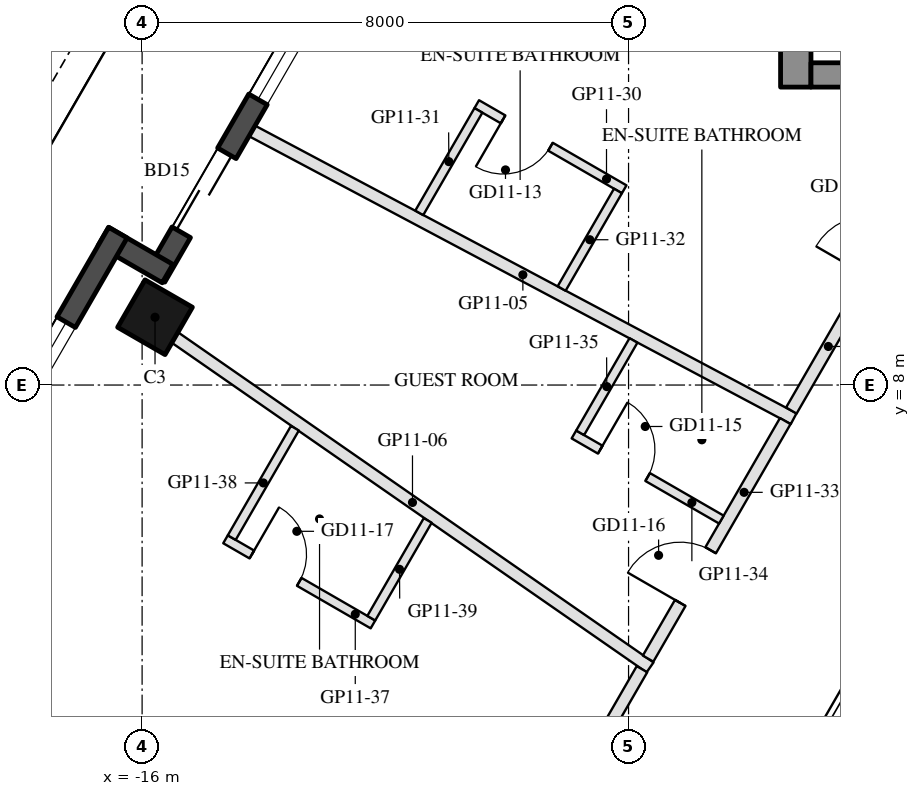
"""IFC4 building model, lengths in metres.
Left out: names, types, materials, properties, quantities, classifications, styles, units other than length and angle.
Written with IfcOpenShell. Run it as: python <this file> out.ifc"""

import sys

from ifc_helpers import new_model, si_unit, direction, frame, frame_2d, origin, origin_2d, place, context, subcontext, project, spatial, rectangle, hollow_rectangle, extrude, element, fill, save


model = new_model("IFC4")
c1 = context("Model", 3, precision=1e-05, world=origin(), true_north=direction((0.0, 1.0)))
c2 = subcontext(c1, "Body", "Model", "MODEL_VIEW")
j1 = project(units=[si_unit("LENGTHUNIT", "METRE"), si_unit("PLANEANGLEUNIT", "RADIAN")], contexts=[c1])
p1 = place(None, origin())
s1 = spatial("IfcSite", under=j1, at=p1, CompositionType="ELEMENT")
p2 = place(p1, origin())
s2 = spatial("IfcBuilding", under=s1, at=p2, CompositionType="ELEMENT")
p3 = place(p2, frame((0.0, 0.0, 127.9)))
s3 = spatial("IfcBuildingStorey", under=s2, at=p3, CompositionType="ELEMENT", Elevation=127.9)
p4 = place(p3, frame((-15.788, 9.115, 0.0), z_axis=(0.0, 0.0, 1.0), x_axis=(0.5, 0.866025403784, 0.0)))
e1 = element("IfcColumn", 1, at=p4, inside=s3, PredefinedType="COLUMN", context=c2, shape_type="SweptSolid", body=[
    extrude(hollow_rectangle(XDim=0.9, YDim=0.9, WallThickness=0.04, at=origin_2d()), origin(), (0.0, 0.0, 1.0), 3.7),
])
p5 = place(p3, frame((-12.409, 15.617, 0.0), z_axis=(0.0, 0.0, 1.0), x_axis=(-0.500003597184, -0.866023326939, 0.0)))
e2 = element("IfcWall", 2, at=p5, inside=s3, PredefinedType="SOLIDWALL", context=c2, shape_type="SweptSolid", body=[
    extrude(rectangle(XDim=6.74, YDim=0.35, at=frame_2d((3.37, 0.0))), origin(), (0.0, 0.0, 1.0), 3.45),
])
p6 = place(p5, frame((0.77, 0.0, 0.3)))
e3 = element("IfcOpeningElement", 3, at=p6, cuts=e2, PredefinedType="OPENING", context=c2, shape_type="SweptSolid", body=[
    extrude(rectangle(XDim=2.6, YDim=2.65, at=frame_2d((1.3, 1.325))), frame((0.0, 0.185, 0.0), z_axis=(0.0, -1.0, 0.0), x_axis=(1.0, 0.0, 0.0)), (0.0, 0.0, 1.0), 0.37),
])
p7 = place(p5, frame((4.394, 0.0, 0.0)))
e4 = element("IfcOpeningElement", 4, at=p7, cuts=e2, PredefinedType="OPENING", context=c2, shape_type="SweptSolid", body=[
    extrude(rectangle(XDim=1.5, YDim=2.4, at=frame_2d((0.75, 1.2))), frame((0.0, 0.185, 0.0), z_axis=(0.0, -1.0, 0.0), x_axis=(1.0, 0.0, 0.0)), (0.0, 0.0, 1.0), 0.37),
])
p8 = place(p3, frame((-15.581, 9.833, 0.0), z_axis=(0.0, 0.0, 1.0), x_axis=(-0.866055662726, 0.499947586314, 0.0)))
e5 = element("IfcWall", 5, at=p8, inside=s3, PredefinedType="SOLIDWALL", context=c2, shape_type="SweptSolid", body=[
    extrude(rectangle(XDim=1.22, YDim=0.35, at=frame_2d((0.61, 0.0))), origin(), (0.0, 0.0, 1.0), 3.45),
])
p9 = place(p3, frame((-16.398, 10.507, 0.0), z_axis=(0.0, 0.0, 1.0), x_axis=(-0.499999142773, -0.866025898704, 0.0)))
e6 = element("IfcWall", 6, at=p9, inside=s3, PredefinedType="SOLIDWALL", context=c2, shape_type="SweptSolid", body=[
    extrude(rectangle(XDim=9.7, YDim=0.35, at=frame_2d((4.85, 0.0))), origin(), (0.0, 0.0, 1.0), 3.45),
])
p10 = place(p9, frame((5.6, 0.0, 0.0)))
e7 = element("IfcOpeningElement", 7, at=p10, cuts=e6, PredefinedType="OPENING", context=c2, shape_type="SweptSolid", body=[
    extrude(rectangle(XDim=2.4, YDim=2.4, at=frame_2d((1.2, 1.2))), frame((0.0, 0.185, 0.0), z_axis=(0.0, -1.0, 0.0), x_axis=(1.0, 0.0, 0.0)), (0.0, 0.0, 1.0), 0.37),
])
p11 = place(p9, frame((1.7, 0.0, 0.3)))
e8 = element("IfcOpeningElement", 8, at=p11, cuts=e6, PredefinedType="OPENING", context=c2, shape_type="SweptSolid", body=[
    extrude(rectangle(XDim=1.6, YDim=2.65, at=frame_2d((0.8, 1.325))), frame((0.0, 0.185, 0.0), z_axis=(0.0, -1.0, 0.0), x_axis=(1.0, 0.0, 0.0)), (0.0, 0.0, 1.0), 0.37),
])
p12 = place(p9, frame((3.6, 0.0, 0.3)))
e9 = element("IfcOpeningElement", 9, at=p12, cuts=e6, PredefinedType="OPENING", context=c2, shape_type="SweptSolid", body=[
    extrude(rectangle(XDim=1.6, YDim=2.65, at=frame_2d((0.8, 1.325))), frame((0.0, 0.185, 0.0), z_axis=(0.0, -1.0, 0.0), x_axis=(1.0, 0.0, 0.0)), (0.0, 0.0, 1.0), 0.37),
])
p13 = place(p3, frame((-5.25, 12.9, 0.0), z_axis=(0.0, 0.0, 1.0), x_axis=(0.0, 1.0, 0.0)))
e10 = element("IfcWall", 10, at=p13, inside=s3, PredefinedType="SHEAR", context=c2, shape_type="SweptSolid", body=[
    extrude(rectangle(XDim=14.837, YDim=0.5, at=frame_2d((7.418, 0.0))), origin(), (0.0, 0.0, 1.0), 3.45),
])
p14 = place(p3, frame((5.0, 13.1, 0.0), z_axis=(0.0, 0.0, 1.0), x_axis=(-1.0, 0.0, 0.0)))
e11 = element("IfcWall", 11, at=p14, inside=s3, PredefinedType="SHEAR", context=c2, shape_type="SweptSolid", body=[
    extrude(rectangle(XDim=10.0, YDim=0.4, at=frame_2d((5.0, 0.0))), origin(), (0.0, 0.0, 1.0), 3.45),
])
p15 = place(p14, frame((3.55, 0.0, 0.0)))
e12 = element("IfcOpeningElement", 12, at=p15, cuts=e11, PredefinedType="OPENING", context=c2, shape_type="SweptSolid", body=[
    extrude(rectangle(XDim=1.1, YDim=2.1, at=frame_2d((0.55, 1.05))), frame((0.0, 0.21, 0.0), z_axis=(0.0, -1.0, 0.0), x_axis=(1.0, 0.0, 0.0)), (0.0, 0.0, 1.0), 0.42),
])
p16 = place(p14, frame((5.85, 0.0, 0.0)))
e13 = element("IfcOpeningElement", 13, at=p16, cuts=e11, PredefinedType="OPENING", context=c2, shape_type="SweptSolid", body=[
    extrude(rectangle(XDim=1.4, YDim=2.1, at=frame_2d((0.7, 1.05))), frame((0.0, 0.21, 0.0), z_axis=(0.0, -1.0, 0.0), x_axis=(1.0, 0.0, 0.0)), (0.0, 0.0, 1.0), 0.42),
])
p17 = place(p3, frame((-14.192, 12.179, 0.0), z_axis=(0.0, 0.0, 1.0), x_axis=(0.883106944183, -0.469171743753, 0.0)))
e14 = element("IfcWall", 14, at=p17, inside=s3, PredefinedType="PARTITIONING", context=c2, shape_type="SweptSolid", body=[
    extrude(rectangle(XDim=10.086, YDim=0.2, at=frame_2d((5.043, 0.0))), origin(), (0.0, 0.0, 1.0), 2.76),
])
p18 = place(p3, frame((-15.46, 8.781, 0.0), z_axis=(0.0, 0.0, 1.0), x_axis=(0.82142273434, -0.570319815113, 0.0)))
e15 = element("IfcWall", 15, at=p18, inside=s3, PredefinedType="PARTITIONING", context=c2, shape_type="SweptSolid", body=[
    extrude(rectangle(XDim=9.513, YDim=0.2, at=frame_2d((4.756, 0.0))), origin(), (0.0, 0.0, 1.0), 2.76),
])
p19 = place(p3, frame((-5.323, 7.581, 0.0), z_axis=(0.0, 0.0, 1.0), x_axis=(0.49998410452, 0.866034580849, 0.0)))
e16 = element("IfcWall", 16, at=p19, inside=s3, PredefinedType="PARTITIONING", context=c2, shape_type="SweptSolid", body=[
    extrude(rectangle(XDim=6.085, YDim=0.2, at=frame_2d((3.042, 0.0))), origin(), (0.0, 0.0, 1.0), 2.76),
])
p20 = place(p19, frame((2.542, 0.0, 0.0)))
e17 = element("IfcOpeningElement", 17, at=p20, cuts=e16, PredefinedType="OPENING", context=c2, shape_type="SweptSolid", body=[
    extrude(rectangle(XDim=1.0, YDim=2.1, at=frame_2d((0.5, 1.05))), frame((0.0, 0.11, 0.0), z_axis=(0.0, -1.0, 0.0), x_axis=(1.0, 0.0, 0.0)), (0.0, 0.0, 1.0), 0.22),
])
p21 = place(p3, frame((-8.072, 11.219, 0.0), z_axis=(0.0, 0.0, 1.0), x_axis=(-0.866034573852, 0.49998411664, 0.0)))
e18 = element("IfcWall", 18, at=p21, inside=s3, PredefinedType="PARTITIONING", context=c2, shape_type="SweptSolid", body=[
    extrude(rectangle(XDim=2.8, YDim=0.15, at=frame_2d((1.4, 0.0))), origin(), (0.0, 0.0, 1.0), 3.45),
])
p22 = place(p21, frame((1.4, 0.0, 0.0)))
e19 = element("IfcOpeningElement", 19, at=p22, cuts=e18, PredefinedType="OPENING", context=c2, shape_type="SweptSolid", body=[
    extrude(rectangle(XDim=0.9, YDim=2.1, at=frame_2d((0.45, 1.05))), frame((0.0, 0.085, 0.0), z_axis=(0.0, -1.0, 0.0), x_axis=(1.0, 0.0, 0.0)), (0.0, 0.0, 1.0), 0.17),
])
p23 = place(p3, frame((-10.469, 12.517, 0.0), z_axis=(0.0, 0.0, 1.0), x_axis=(-0.500051850797, -0.865995465643, 0.0)))
e20 = element("IfcWall", 20, at=p23, inside=s3, PredefinedType="PARTITIONING", context=c2, shape_type="SweptSolid", body=[
    extrude(rectangle(XDim=1.946, YDim=0.15, at=frame_2d((0.973, 0.0))), origin(), (0.0, 0.0, 1.0), 2.76),
])
p24 = place(p3, frame((-8.174, 11.192, 0.0), z_axis=(0.0, 0.0, 1.0), x_axis=(-0.500022870649, -0.866012199007, 0.0)))
e21 = element("IfcWall", 21, at=p24, inside=s3, PredefinedType="PARTITIONING", context=c2, shape_type="SweptSolid", body=[
    extrude(rectangle(XDim=1.853, YDim=0.15, at=frame_2d((0.926, 0.0))), origin(), (0.0, 0.0, 1.0), 2.76),
])
p25 = place(p3, frame((-7.679, 3.5, 0.0), z_axis=(0.0, 0.0, 1.0), x_axis=(0.500026934738, 0.866009852448, 0.0)))
e22 = element("IfcWall", 22, at=p25, inside=s3, PredefinedType="PARTITIONING", context=c2, shape_type="SweptSolid", body=[
    extrude(rectangle(XDim=4.511, YDim=0.2, at=frame_2d((2.256, 0.0))), origin(), (0.0, 0.0, 1.0), 2.76),
])
p26 = place(p25, frame((1.058, 0.0, 0.0)))
e23 = element("IfcOpeningElement", 23, at=p26, cuts=e22, PredefinedType="OPENING", context=c2, shape_type="SweptSolid", body=[
    extrude(rectangle(XDim=1.0, YDim=2.1, at=frame_2d((0.5, 1.05))), frame((0.0, 0.11, 0.0), z_axis=(0.0, -1.0, 0.0), x_axis=(1.0, 0.0, 0.0)), (0.0, 0.0, 1.0), 0.22),
])
p27 = place(p3, frame((-8.899, 7.187, 0.0), z_axis=(0.0, 0.0, 1.0), x_axis=(0.866056369097, -0.49994636267, 0.0)))
e24 = element("IfcWall", 24, at=p27, inside=s3, PredefinedType="PARTITIONING", context=c2, shape_type="SweptSolid", body=[
    extrude(rectangle(XDim=2.8, YDim=0.15, at=frame_2d((1.4, 0.0))), origin(), (0.0, 0.0, 1.0), 3.45),
])
p28 = place(p27, frame((0.5, 0.0, 0.0)))
e25 = element("IfcOpeningElement", 25, at=p28, cuts=e24, PredefinedType="OPENING", context=c2, shape_type="SweptSolid", body=[
    extrude(rectangle(XDim=0.9, YDim=2.1, at=frame_2d((0.45, 1.05))), frame((0.0, 0.085, 0.0), z_axis=(0.0, -1.0, 0.0), x_axis=(1.0, 0.0, 0.0)), (0.0, 0.0, 1.0), 0.17),
])
p29 = place(p3, frame((-7.919, 8.734, 0.0), z_axis=(0.0, 0.0, 1.0), x_axis=(-0.499971461383, -0.866041879935, 0.0)))
e26 = element("IfcWall", 26, at=p29, inside=s3, PredefinedType="PARTITIONING", context=c2, shape_type="SweptSolid", body=[
    extrude(rectangle(XDim=1.754, YDim=0.15, at=frame_2d((0.877, 0.0))), origin(), (0.0, 0.0, 1.0), 3.45),
])
p30 = place(p3, frame((-12.269, -4.45, 0.0), z_axis=(0.0, 0.0, 1.0), x_axis=(0.500004878216, 0.866022587327, 0.0)))
e27 = element("IfcWall", 27, at=p30, inside=s3, PredefinedType="PARTITIONING", context=c2, shape_type="SweptSolid", body=[
    extrude(rectangle(XDim=8.979, YDim=0.2, at=frame_2d((4.49, 0.0))), origin(), (0.0, 0.0, 1.0), 2.76),
])
p31 = place(p30, frame((3.99, 0.0, 0.0)))
e28 = element("IfcOpeningElement", 28, at=p31, cuts=e27, PredefinedType="OPENING", context=c2, shape_type="SweptSolid", body=[
    extrude(rectangle(XDim=1.0, YDim=2.1, at=frame_2d((0.5, 1.05))), frame((0.0, 0.11, 0.0), z_axis=(0.0, -1.0, 0.0), x_axis=(1.0, 0.0, 0.0)), (0.0, 0.0, 1.0), 0.22),
])
p32 = place(p3, frame((-14.628, 5.463, 0.0), z_axis=(0.0, 0.0, 1.0), x_axis=(0.866056369097, -0.49994636267, 0.0)))
e29 = element("IfcWall", 29, at=p32, inside=s3, PredefinedType="PARTITIONING", context=c2, shape_type="SweptSolid", body=[
    extrude(rectangle(XDim=2.8, YDim=0.15, at=frame_2d((1.4, 0.0))), origin(), (0.0, 0.0, 1.0), 3.45),
])
p33 = place(p32, frame((0.5, 0.0, 0.0)))
e30 = element("IfcOpeningElement", 30, at=p33, cuts=e29, PredefinedType="OPENING", context=c2, shape_type="SweptSolid", body=[
    extrude(rectangle(XDim=0.9, YDim=2.1, at=frame_2d((0.45, 1.05))), frame((0.0, 0.085, 0.0), z_axis=(0.0, -1.0, 0.0), x_axis=(1.0, 0.0, 0.0)), (0.0, 0.0, 1.0), 0.17),
])
p34 = place(p3, frame((-13.487, 7.29, 0.0), z_axis=(0.0, 0.0, 1.0), x_axis=(-0.500044586128, -0.865999660441, 0.0)))
e31 = element("IfcWall", 31, at=p34, inside=s3, PredefinedType="PARTITIONING", context=c2, shape_type="SweptSolid", body=[
    extrude(rectangle(XDim=2.077, YDim=0.15, at=frame_2d((1.039, 0.0))), origin(), (0.0, 0.0, 1.0), 3.45),
])
p35 = place(p3, frame((-11.303, 5.773, 0.0), z_axis=(0.0, 0.0, 1.0), x_axis=(-0.500071598593, -0.865984062371, 0.0)))
e32 = element("IfcWall", 32, at=p35, inside=s3, PredefinedType="PARTITIONING", context=c2, shape_type="SweptSolid", body=[
    extrude(rectangle(XDim=1.856, YDim=0.15, at=frame_2d((0.928, 0.0))), origin(), (0.0, 0.0, 1.0), 3.45),
])
p36 = place(p6, origin())
e33 = element("IfcWindow", 33, at=p36, inside=s3, PartitioningType="SINGLE_PANEL", PredefinedType="WINDOW", context=c2, shape_type="SweptSolid", body=[
    extrude(rectangle(XDim=2.6, YDim=2.65, at=frame_2d((1.3, 1.325))), frame((0.0, 0.03, 0.0), z_axis=(0.0, -1.0, 0.0), x_axis=(1.0, 0.0, 0.0)), (0.0, 0.0, 1.0), 0.06),
])
fill(e3, e33)
p37 = place(p7, frame((1.5, 0.0, 0.0), z_axis=(0.0, 0.0, 1.0), x_axis=(-1.0, 0.0, 0.0)))
e34 = element("IfcDoor", 34, at=p37, inside=s3, OperationType="SLIDING_TO_LEFT", PredefinedType="DOOR", context=c2, shape_type="SweptSolid", body=[
    extrude(rectangle(XDim=1.5, YDim=2.4, at=frame_2d((0.75, 1.2))), frame((0.0, 0.025, 0.0), z_axis=(0.0, -1.0, 0.0), x_axis=(1.0, 0.0, 0.0)), (0.0, 0.0, 1.0), 0.05),
])
fill(e4, e34)
p38 = place(p11, origin())
e35 = element("IfcWindow", 35, at=p38, inside=s3, PartitioningType="SINGLE_PANEL", PredefinedType="WINDOW", context=c2, shape_type="SweptSolid", body=[
    extrude(rectangle(XDim=1.6, YDim=2.65, at=frame_2d((0.8, 1.325))), frame((0.0, 0.03, 0.0), z_axis=(0.0, -1.0, 0.0), x_axis=(1.0, 0.0, 0.0)), (0.0, 0.0, 1.0), 0.06),
])
fill(e8, e35)
p39 = place(p22, origin())
e36 = element("IfcDoor", 36, at=p39, inside=s3, OperationType="SINGLE_SWING_RIGHT", PredefinedType="DOOR", context=c2, shape_type="SweptSolid", body=[
    extrude(rectangle(XDim=0.9, YDim=2.1, at=frame_2d((0.45, 1.05))), frame((0.0, 0.025, 0.0), z_axis=(0.0, -1.0, 0.0), x_axis=(1.0, 0.0, 0.0)), (0.0, 0.0, 1.0), 0.05),
])
fill(e19, e36)
p40 = place(p28, origin())
e37 = element("IfcDoor", 37, at=p40, inside=s3, OperationType="SINGLE_SWING_LEFT", PredefinedType="DOOR", context=c2, shape_type="SweptSolid", body=[
    extrude(rectangle(XDim=0.9, YDim=2.1, at=frame_2d((0.45, 1.05))), frame((0.0, 0.025, 0.0), z_axis=(0.0, -1.0, 0.0), x_axis=(1.0, 0.0, 0.0)), (0.0, 0.0, 1.0), 0.05),
])
fill(e25, e37)
p41 = place(p26, origin())
e38 = element("IfcDoor", 38, at=p41, inside=s3, OperationType="SINGLE_SWING_LEFT", PredefinedType="DOOR", context=c2, shape_type="SweptSolid", body=[
    extrude(rectangle(XDim=1.0, YDim=2.1, at=frame_2d((0.5, 1.05))), frame((0.0, 0.025, 0.0), z_axis=(0.0, -1.0, 0.0), x_axis=(1.0, 0.0, 0.0)), (0.0, 0.0, 1.0), 0.05),
])
fill(e23, e38)
p42 = place(p33, origin())
e39 = element("IfcDoor", 39, at=p42, inside=s3, OperationType="SINGLE_SWING_LEFT", PredefinedType="DOOR", context=c2, shape_type="SweptSolid", body=[
    extrude(rectangle(XDim=0.9, YDim=2.1, at=frame_2d((0.45, 1.05))), frame((0.0, 0.025, 0.0), z_axis=(0.0, -1.0, 0.0), x_axis=(1.0, 0.0, 0.0)), (0.0, 0.0, 1.0), 0.05),
])
fill(e30, e39)
save(model, sys.argv[1])
